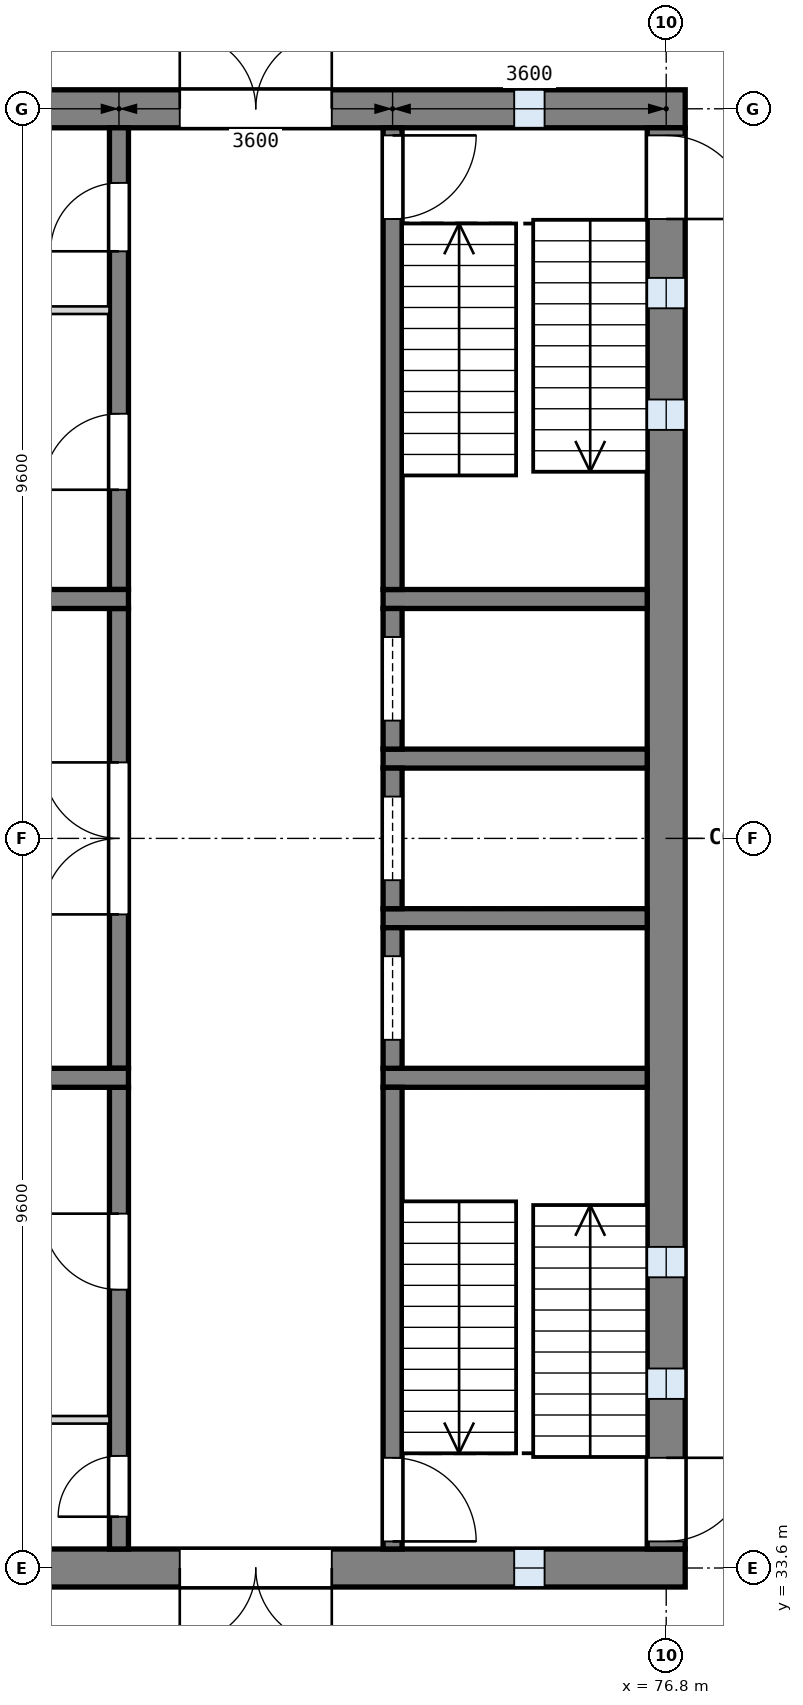
"""IFC4 building model, lengths in metres.
Left out: names, types, materials, properties, quantities, classifications, styles, units other than length and angle.
Written with IfcOpenShell. Run it as: python <this file> out.ifc"""

import sys

from ifc_helpers import new_model, si_unit, direction, frame, frame_2d, origin, place, context, subcontext, project, spatial, rectangle, extrude, element, fill, save


model = new_model("IFC4")
c1 = context("Model", 3, precision=1e-05, world=origin(), true_north=direction((0.0, 1.0)))
c2 = subcontext(c1, "Body", "Model", "MODEL_VIEW")
j1 = project(units=[si_unit("LENGTHUNIT", "METRE"), si_unit("PLANEANGLEUNIT", "RADIAN")], contexts=[c1])
p1 = place(None, origin())
s1 = spatial("IfcSite", under=j1, at=p1, CompositionType="ELEMENT")
p2 = place(p1, origin())
s2 = spatial("IfcBuilding", under=s1, at=p2, CompositionType="ELEMENT")
p3 = place(p2, frame((0.0, 0.0, 8.4)))
s3 = spatial("IfcBuildingStorey", under=s2, at=p3, CompositionType="ELEMENT", Elevation=8.4)
p4 = place(p3, frame((63.75, 52.8, 0.0), z_axis=(0.0, 0.0, 1.0), x_axis=(1.0, 0.0, 0.0)))
e1 = element("IfcWall", 1, at=p4, inside=s3, PredefinedType="SHEAR", context=c2, shape_type="SweptSolid", body=[
    extrude(rectangle(XDim=13.3, YDim=0.5, at=frame_2d((6.65, 0.0))), origin(), (0.0, 0.0, 1.0), 4.5),
])
p5 = place(p4, frame((11.05, 0.0, 1.0)))
e2 = element("IfcOpeningElement", 2, at=p5, cuts=e1, PredefinedType="OPENING", context=c2, shape_type="SweptSolid", body=[
    extrude(rectangle(XDim=0.4, YDim=2.0, at=frame_2d((0.2, 1.0))), frame((0.0, 0.26, 0.0), z_axis=(0.0, -1.0, 0.0), x_axis=(1.0, 0.0, 0.0)), (0.0, 0.0, 1.0), 0.52),
])
p6 = place(p4, frame((6.65, 0.0, 0.0)))
e3 = element("IfcOpeningElement", 3, at=p6, cuts=e1, PredefinedType="OPENING", context=c2, shape_type="SweptSolid", body=[
    extrude(rectangle(XDim=2.0, YDim=2.1, at=frame_2d((1.0, 1.05))), frame((0.0, 0.26, 0.0), z_axis=(0.0, -1.0, 0.0), x_axis=(1.0, 0.0, 0.0)), (0.0, 0.0, 1.0), 0.52),
])
p7 = place(p3, frame((63.75, 33.6, 0.0), z_axis=(0.0, 0.0, 1.0), x_axis=(1.0, 0.0, 0.0)))
e4 = element("IfcWall", 4, at=p7, inside=s3, PredefinedType="SHEAR", context=c2, shape_type="SweptSolid", body=[
    extrude(rectangle(XDim=13.3, YDim=0.5, at=frame_2d((6.65, 0.0))), origin(), (0.0, 0.0, 1.0), 4.5),
])
p8 = place(p7, frame((11.05, 0.0, 1.0)))
e5 = element("IfcOpeningElement", 5, at=p8, cuts=e4, PredefinedType="OPENING", context=c2, shape_type="SweptSolid", body=[
    extrude(rectangle(XDim=0.4, YDim=2.0, at=frame_2d((0.2, 1.0))), frame((0.0, 0.26, 0.0), z_axis=(0.0, -1.0, 0.0), x_axis=(1.0, 0.0, 0.0)), (0.0, 0.0, 1.0), 0.52),
])
p9 = place(p7, frame((6.65, 0.0, 0.0)))
e6 = element("IfcOpeningElement", 6, at=p9, cuts=e4, PredefinedType="OPENING", context=c2, shape_type="SweptSolid", body=[
    extrude(rectangle(XDim=2.0, YDim=2.1, at=frame_2d((1.0, 1.05))), frame((0.0, 0.26, 0.0), z_axis=(0.0, -1.0, 0.0), x_axis=(1.0, 0.0, 0.0)), (0.0, 0.0, 1.0), 0.52),
])
p10 = place(p3, frame((76.8, 33.85, 0.0), z_axis=(0.0, 0.0, 1.0), x_axis=(0.0, 1.0, 0.0)))
e7 = element("IfcWall", 7, at=p10, inside=s3, PredefinedType="SHEAR", context=c2, shape_type="SweptSolid", body=[
    extrude(rectangle(XDim=18.7, YDim=0.5, at=frame_2d((9.35, 0.0))), origin(), (0.0, 0.0, 1.0), 4.5),
])
p11 = place(p10, frame((1.975, 0.0, 1.0)))
e8 = element("IfcOpeningElement", 8, at=p11, cuts=e7, PredefinedType="OPENING", context=c2, shape_type="SweptSolid", body=[
    extrude(rectangle(XDim=0.4, YDim=2.0, at=frame_2d((0.2, 1.0))), frame((0.0, 0.26, 0.0), z_axis=(0.0, -1.0, 0.0), x_axis=(1.0, 0.0, 0.0)), (0.0, 0.0, 1.0), 0.52),
])
p12 = place(p10, frame((3.575, 0.0, 1.0)))
e9 = element("IfcOpeningElement", 9, at=p12, cuts=e7, PredefinedType="OPENING", context=c2, shape_type="SweptSolid", body=[
    extrude(rectangle(XDim=0.4, YDim=2.0, at=frame_2d((0.2, 1.0))), frame((0.0, 0.26, 0.0), z_axis=(0.0, -1.0, 0.0), x_axis=(1.0, 0.0, 0.0)), (0.0, 0.0, 1.0), 0.52),
])
p13 = place(p10, frame((14.725, 0.0, 1.0)))
e10 = element("IfcOpeningElement", 10, at=p13, cuts=e7, PredefinedType="OPENING", context=c2, shape_type="SweptSolid", body=[
    extrude(rectangle(XDim=0.4, YDim=2.0, at=frame_2d((0.2, 1.0))), frame((0.0, 0.26, 0.0), z_axis=(0.0, -1.0, 0.0), x_axis=(1.0, 0.0, 0.0)), (0.0, 0.0, 1.0), 0.52),
])
p14 = place(p10, frame((16.325, 0.0, 1.0)))
e11 = element("IfcOpeningElement", 11, at=p14, cuts=e7, PredefinedType="OPENING", context=c2, shape_type="SweptSolid", body=[
    extrude(rectangle(XDim=0.4, YDim=2.0, at=frame_2d((0.2, 1.0))), frame((0.0, 0.26, 0.0), z_axis=(0.0, -1.0, 0.0), x_axis=(1.0, 0.0, 0.0)), (0.0, 0.0, 1.0), 0.52),
])
p15 = place(p10, frame((0.1, 0.0, 0.0)))
e12 = element("IfcOpeningElement", 12, at=p15, cuts=e7, PredefinedType="OPENING", context=c2, shape_type="SweptSolid", body=[
    extrude(rectangle(XDim=1.1, YDim=2.1, at=frame_2d((0.55, 1.05))), frame((0.0, 0.26, 0.0), z_axis=(0.0, -1.0, 0.0), x_axis=(1.0, 0.0, 0.0)), (0.0, 0.0, 1.0), 0.52),
])
p16 = place(p10, frame((17.5, 0.0, 0.0)))
e13 = element("IfcOpeningElement", 13, at=p16, cuts=e7, PredefinedType="OPENING", context=c2, shape_type="SweptSolid", body=[
    extrude(rectangle(XDim=1.1, YDim=2.1, at=frame_2d((0.55, 1.05))), frame((0.0, 0.26, 0.0), z_axis=(0.0, -1.0, 0.0), x_axis=(1.0, 0.0, 0.0)), (0.0, 0.0, 1.0), 0.52),
])
for number, where, z_axis, x_axis in (
    (14, (76.55, 40.05, 0.0), (0.0, 0.0, 1.0), (-1.0, 0.0, 0.0)),
    (15, (76.55, 42.15, 0.0), (0.0, 0.0, 1.0), (-1.0, 0.0, 0.0)),
    (16, (76.55, 44.25, 0.0), (0.0, 0.0, 1.0), (-1.0, 0.0, 0.0)),
    (17, (76.55, 46.35, 0.0), (0.0, 0.0, 1.0), (-1.0, 0.0, 0.0)),
):
    element("IfcWall", number, at=place(p3, frame(where, z_axis=z_axis, x_axis=x_axis)), inside=s3, PredefinedType="SOLIDWALL", context=c2, shape_type="SweptSolid", body=[
        extrude(rectangle(XDim=3.475, YDim=0.25, at=frame_2d((1.738, 0.0))), origin(), (0.0, 0.0, 1.0), 4.2),
    ])
p17 = place(p3, frame((73.2, 33.85, 0.0), z_axis=(0.0, 0.0, 1.0), x_axis=(0.0, 1.0, 0.0)))
e18 = element("IfcWall", 18, at=p17, inside=s3, PredefinedType="SOLIDWALL", context=c2, shape_type="SweptSolid", body=[
    extrude(rectangle(XDim=6.075, YDim=0.25, at=frame_2d((3.038, 0.0))), origin(), (0.0, 0.0, 1.0), 4.2),
])
p18 = place(p17, frame((0.1, 0.0, 0.0)))
e19 = element("IfcOpeningElement", 19, at=p18, cuts=e18, PredefinedType="OPENING", context=c2, shape_type="SweptSolid", body=[
    extrude(rectangle(XDim=1.1, YDim=2.1, at=frame_2d((0.55, 1.05))), frame((0.0, 0.135, 0.0), z_axis=(0.0, -1.0, 0.0), x_axis=(1.0, 0.0, 0.0)), (0.0, 0.0, 1.0), 0.27),
])
p19 = place(p3, frame((73.2, 40.175, 0.0), z_axis=(0.0, 0.0, 1.0), x_axis=(0.0, 1.0, 0.0)))
e20 = element("IfcWall", 20, at=p19, inside=s3, PredefinedType="SOLIDWALL", context=c2, shape_type="SweptSolid", body=[
    extrude(rectangle(XDim=1.85, YDim=0.25, at=frame_2d((0.925, 0.0))), origin(), (0.0, 0.0, 1.0), 4.2),
])
p20 = place(p19, frame((0.375, 0.0, 0.0)))
e21 = element("IfcOpeningElement", 21, at=p20, cuts=e20, PredefinedType="OPENING", context=c2, shape_type="SweptSolid", body=[
    extrude(rectangle(XDim=1.1, YDim=2.1, at=frame_2d((0.55, 1.05))), frame((0.0, 0.135, 0.0), z_axis=(0.0, -1.0, 0.0), x_axis=(1.0, 0.0, 0.0)), (0.0, 0.0, 1.0), 0.27),
])
p21 = place(p3, frame((73.2, 42.275, 0.0), z_axis=(0.0, 0.0, 1.0), x_axis=(0.0, 1.0, 0.0)))
e22 = element("IfcWall", 22, at=p21, inside=s3, PredefinedType="SOLIDWALL", context=c2, shape_type="SweptSolid", body=[
    extrude(rectangle(XDim=1.85, YDim=0.25, at=frame_2d((0.925, 0.0))), origin(), (0.0, 0.0, 1.0), 4.2),
])
p22 = place(p21, frame((0.375, 0.0, 0.0)))
e23 = element("IfcOpeningElement", 23, at=p22, cuts=e22, PredefinedType="OPENING", context=c2, shape_type="SweptSolid", body=[
    extrude(rectangle(XDim=1.1, YDim=2.1, at=frame_2d((0.55, 1.05))), frame((0.0, 0.135, 0.0), z_axis=(0.0, -1.0, 0.0), x_axis=(1.0, 0.0, 0.0)), (0.0, 0.0, 1.0), 0.27),
])
p23 = place(p3, frame((73.2, 44.375, 0.0), z_axis=(0.0, 0.0, 1.0), x_axis=(0.0, 1.0, 0.0)))
e24 = element("IfcWall", 24, at=p23, inside=s3, PredefinedType="SOLIDWALL", context=c2, shape_type="SweptSolid", body=[
    extrude(rectangle(XDim=1.85, YDim=0.25, at=frame_2d((0.925, 0.0))), origin(), (0.0, 0.0, 1.0), 4.2),
])
p24 = place(p23, frame((0.375, 0.0, 0.0)))
e25 = element("IfcOpeningElement", 25, at=p24, cuts=e24, PredefinedType="OPENING", context=c2, shape_type="SweptSolid", body=[
    extrude(rectangle(XDim=1.1, YDim=2.1, at=frame_2d((0.55, 1.05))), frame((0.0, 0.135, 0.0), z_axis=(0.0, -1.0, 0.0), x_axis=(1.0, 0.0, 0.0)), (0.0, 0.0, 1.0), 0.27),
])
p25 = place(p3, frame((73.2, 46.475, 0.0), z_axis=(0.0, 0.0, 1.0), x_axis=(0.0, 1.0, 0.0)))
e26 = element("IfcWall", 26, at=p25, inside=s3, PredefinedType="SOLIDWALL", context=c2, shape_type="SweptSolid", body=[
    extrude(rectangle(XDim=6.075, YDim=0.25, at=frame_2d((3.038, 0.0))), origin(), (0.0, 0.0, 1.0), 4.2),
])
p26 = place(p25, frame((4.875, 0.0, 0.0)))
e27 = element("IfcOpeningElement", 27, at=p26, cuts=e26, PredefinedType="OPENING", context=c2, shape_type="SweptSolid", body=[
    extrude(rectangle(XDim=1.1, YDim=2.1, at=frame_2d((0.55, 1.05))), frame((0.0, 0.135, 0.0), z_axis=(0.0, -1.0, 0.0), x_axis=(1.0, 0.0, 0.0)), (0.0, 0.0, 1.0), 0.27),
])
p27 = place(p3, frame((69.6, 33.85, 0.0), z_axis=(0.0, 0.0, 1.0), x_axis=(0.0, 1.0, 0.0)))
e28 = element("IfcWall", 28, at=p27, inside=s3, PredefinedType="SOLIDWALL", context=c2, shape_type="SweptSolid", body=[
    extrude(rectangle(XDim=6.075, YDim=0.25, at=frame_2d((3.038, 0.0))), origin(), (0.0, 0.0, 1.0), 4.2),
])
p28 = place(p27, frame((0.425, 0.0, 0.0)))
e29 = element("IfcOpeningElement", 29, at=p28, cuts=e28, PredefinedType="OPENING", context=c2, shape_type="SweptSolid", body=[
    extrude(rectangle(XDim=0.8, YDim=2.1, at=frame_2d((0.4, 1.05))), frame((0.0, 0.135, 0.0), z_axis=(0.0, -1.0, 0.0), x_axis=(1.0, 0.0, 0.0)), (0.0, 0.0, 1.0), 0.27),
])
p29 = place(p27, frame((3.413, 0.0, 0.0)))
e30 = element("IfcOpeningElement", 30, at=p29, cuts=e28, PredefinedType="OPENING", context=c2, shape_type="SweptSolid", body=[
    extrude(rectangle(XDim=1.0, YDim=2.1, at=frame_2d((0.5, 1.05))), frame((0.0, 0.135, 0.0), z_axis=(0.0, -1.0, 0.0), x_axis=(1.0, 0.0, 0.0)), (0.0, 0.0, 1.0), 0.27),
])
p30 = place(p3, frame((69.6, 40.175, 0.0), z_axis=(0.0, 0.0, 1.0), x_axis=(0.0, 1.0, 0.0)))
e31 = element("IfcWall", 31, at=p30, inside=s3, PredefinedType="SOLIDWALL", context=c2, shape_type="SweptSolid", body=[
    extrude(rectangle(XDim=6.05, YDim=0.25, at=frame_2d((3.025, 0.0))), origin(), (0.0, 0.0, 1.0), 4.2),
])
p31 = place(p30, frame((2.025, 0.0, 0.0)))
e32 = element("IfcOpeningElement", 32, at=p31, cuts=e31, PredefinedType="OPENING", context=c2, shape_type="SweptSolid", body=[
    extrude(rectangle(XDim=2.0, YDim=2.1, at=frame_2d((1.0, 1.05))), frame((0.0, 0.135, 0.0), z_axis=(0.0, -1.0, 0.0), x_axis=(1.0, 0.0, 0.0)), (0.0, 0.0, 1.0), 0.27),
])
p32 = place(p3, frame((69.6, 46.475, 0.0), z_axis=(0.0, 0.0, 1.0), x_axis=(0.0, 1.0, 0.0)))
e33 = element("IfcWall", 33, at=p32, inside=s3, PredefinedType="SOLIDWALL", context=c2, shape_type="SweptSolid", body=[
    extrude(rectangle(XDim=6.075, YDim=0.25, at=frame_2d((3.038, 0.0))), origin(), (0.0, 0.0, 1.0), 4.2),
])
p33 = place(p32, frame((1.312, 0.0, 0.0)))
e34 = element("IfcOpeningElement", 34, at=p33, cuts=e33, PredefinedType="OPENING", context=c2, shape_type="SweptSolid", body=[
    extrude(rectangle(XDim=1.0, YDim=2.1, at=frame_2d((0.5, 1.05))), frame((0.0, 0.135, 0.0), z_axis=(0.0, -1.0, 0.0), x_axis=(1.0, 0.0, 0.0)), (0.0, 0.0, 1.0), 0.27),
])
p34 = place(p32, frame((4.45, 0.0, 0.0)))
e35 = element("IfcOpeningElement", 35, at=p34, cuts=e33, PredefinedType="OPENING", context=c2, shape_type="SweptSolid", body=[
    extrude(rectangle(XDim=0.9, YDim=2.1, at=frame_2d((0.45, 1.05))), frame((0.0, 0.135, 0.0), z_axis=(0.0, -1.0, 0.0), x_axis=(1.0, 0.0, 0.0)), (0.0, 0.0, 1.0), 0.27),
])
for number, where, z_axis, x_axis in (
    (36, (69.725, 40.05, 0.0), (0.0, 0.0, 1.0), (-1.0, 0.0, 0.0)),
    (37, (69.725, 46.35, 0.0), (0.0, 0.0, 1.0), (-1.0, 0.0, 0.0)),
):
    element("IfcWall", number, at=place(p3, frame(where, z_axis=z_axis, x_axis=x_axis)), inside=s3, PredefinedType="SOLIDWALL", context=c2, shape_type="SweptSolid", body=[
        extrude(rectangle(XDim=5.475, YDim=0.25, at=frame_2d((2.738, 0.0))), origin(), (0.0, 0.0, 1.0), 4.2),
    ])
for number, where, z_axis, x_axis in (
    (38, (69.475, 35.55, 0.0), (0.0, 0.0, 1.0), (-1.0, 0.0, 0.0)),
    (39, (69.475, 50.15, 0.0), (0.0, 0.0, 1.0), (-1.0, 0.0, 0.0)),
):
    element("IfcWall", number, at=place(p3, frame(where, z_axis=z_axis, x_axis=x_axis)), inside=s3, PredefinedType="PARTITIONING", context=c2, shape_type="SweptSolid", body=[
        extrude(rectangle(XDim=5.225, YDim=0.1, at=frame_2d((2.613, 0.0))), origin(), (0.0, 0.0, 1.0), 4.2),
    ])
p35 = place(p11, origin())
e40 = element("IfcWindow", 40, at=p35, inside=s3, PartitioningType="SINGLE_PANEL", PredefinedType="WINDOW", context=c2, shape_type="SweptSolid", body=[
    extrude(rectangle(XDim=0.4, YDim=2.0, at=frame_2d((0.2, 1.0))), frame((0.0, 0.03, 0.0), z_axis=(0.0, -1.0, 0.0), x_axis=(1.0, 0.0, 0.0)), (0.0, 0.0, 1.0), 0.06),
])
fill(e8, e40)
p36 = place(p12, origin())
e41 = element("IfcWindow", 41, at=p36, inside=s3, PartitioningType="SINGLE_PANEL", PredefinedType="WINDOW", context=c2, shape_type="SweptSolid", body=[
    extrude(rectangle(XDim=0.4, YDim=2.0, at=frame_2d((0.2, 1.0))), frame((0.0, 0.03, 0.0), z_axis=(0.0, -1.0, 0.0), x_axis=(1.0, 0.0, 0.0)), (0.0, 0.0, 1.0), 0.06),
])
fill(e9, e41)
p37 = place(p13, origin())
e42 = element("IfcWindow", 42, at=p37, inside=s3, PartitioningType="SINGLE_PANEL", PredefinedType="WINDOW", context=c2, shape_type="SweptSolid", body=[
    extrude(rectangle(XDim=0.4, YDim=2.0, at=frame_2d((0.2, 1.0))), frame((0.0, 0.03, 0.0), z_axis=(0.0, -1.0, 0.0), x_axis=(1.0, 0.0, 0.0)), (0.0, 0.0, 1.0), 0.06),
])
fill(e10, e42)
p38 = place(p14, origin())
e43 = element("IfcWindow", 43, at=p38, inside=s3, PartitioningType="SINGLE_PANEL", PredefinedType="WINDOW", context=c2, shape_type="SweptSolid", body=[
    extrude(rectangle(XDim=0.4, YDim=2.0, at=frame_2d((0.2, 1.0))), frame((0.0, 0.03, 0.0), z_axis=(0.0, -1.0, 0.0), x_axis=(1.0, 0.0, 0.0)), (0.0, 0.0, 1.0), 0.06),
])
fill(e11, e43)
p39 = place(p8, origin())
e44 = element("IfcWindow", 44, at=p39, inside=s3, PartitioningType="SINGLE_PANEL", PredefinedType="WINDOW", context=c2, shape_type="SweptSolid", body=[
    extrude(rectangle(XDim=0.4, YDim=2.0, at=frame_2d((0.2, 1.0))), frame((0.0, 0.03, 0.0), z_axis=(0.0, -1.0, 0.0), x_axis=(1.0, 0.0, 0.0)), (0.0, 0.0, 1.0), 0.06),
])
fill(e5, e44)
p40 = place(p5, origin())
e45 = element("IfcWindow", 45, at=p40, inside=s3, PartitioningType="SINGLE_PANEL", PredefinedType="WINDOW", context=c2, shape_type="SweptSolid", body=[
    extrude(rectangle(XDim=0.4, YDim=2.0, at=frame_2d((0.2, 1.0))), frame((0.0, 0.03, 0.0), z_axis=(0.0, -1.0, 0.0), x_axis=(1.0, 0.0, 0.0)), (0.0, 0.0, 1.0), 0.06),
])
fill(e2, e45)
p41 = place(p18, frame((1.1, 0.0, 0.0), z_axis=(0.0, 0.0, 1.0), x_axis=(-1.0, 0.0, 0.0)))
e46 = element("IfcDoor", 46, at=p41, inside=s3, OperationType="SINGLE_SWING_RIGHT", PredefinedType="DOOR", context=c2, shape_type="SweptSolid", body=[
    extrude(rectangle(XDim=1.1, YDim=2.1, at=frame_2d((0.55, 1.05))), frame((0.0, 0.025, 0.0), z_axis=(0.0, -1.0, 0.0), x_axis=(1.0, 0.0, 0.0)), (0.0, 0.0, 1.0), 0.05),
])
fill(e19, e46)
p42 = place(p26, frame((1.1, 0.0, 0.0), z_axis=(0.0, 0.0, 1.0), x_axis=(-1.0, 0.0, 0.0)))
e47 = element("IfcDoor", 47, at=p42, inside=s3, OperationType="SINGLE_SWING_LEFT", PredefinedType="DOOR", context=c2, shape_type="SweptSolid", body=[
    extrude(rectangle(XDim=1.1, YDim=2.1, at=frame_2d((0.55, 1.05))), frame((0.0, 0.025, 0.0), z_axis=(0.0, -1.0, 0.0), x_axis=(1.0, 0.0, 0.0)), (0.0, 0.0, 1.0), 0.05),
])
fill(e27, e47)
p43 = place(p20, origin())
e48 = element("IfcDoor", 48, at=p43, inside=s3, OperationType="SLIDING_TO_LEFT", PredefinedType="DOOR", context=c2, shape_type="SweptSolid", body=[
    extrude(rectangle(XDim=1.1, YDim=2.1, at=frame_2d((0.55, 1.05))), frame((0.0, 0.025, 0.0), z_axis=(0.0, -1.0, 0.0), x_axis=(1.0, 0.0, 0.0)), (0.0, 0.0, 1.0), 0.05),
])
fill(e21, e48)
p44 = place(p22, origin())
e49 = element("IfcDoor", 49, at=p44, inside=s3, OperationType="SLIDING_TO_LEFT", PredefinedType="DOOR", context=c2, shape_type="SweptSolid", body=[
    extrude(rectangle(XDim=1.1, YDim=2.1, at=frame_2d((0.55, 1.05))), frame((0.0, 0.025, 0.0), z_axis=(0.0, -1.0, 0.0), x_axis=(1.0, 0.0, 0.0)), (0.0, 0.0, 1.0), 0.05),
])
fill(e23, e49)
p45 = place(p24, origin())
e50 = element("IfcDoor", 50, at=p45, inside=s3, OperationType="SLIDING_TO_LEFT", PredefinedType="DOOR", context=c2, shape_type="SweptSolid", body=[
    extrude(rectangle(XDim=1.1, YDim=2.1, at=frame_2d((0.55, 1.05))), frame((0.0, 0.025, 0.0), z_axis=(0.0, -1.0, 0.0), x_axis=(1.0, 0.0, 0.0)), (0.0, 0.0, 1.0), 0.05),
])
fill(e25, e50)
p46 = place(p31, origin())
e51 = element("IfcDoor", 51, at=p46, inside=s3, OperationType="DOUBLE_DOOR_SINGLE_SWING", PredefinedType="DOOR", context=c2, shape_type="SweptSolid", body=[
    extrude(rectangle(XDim=2.0, YDim=2.1, at=frame_2d((1.0, 1.05))), frame((0.0, 0.025, 0.0), z_axis=(0.0, -1.0, 0.0), x_axis=(1.0, 0.0, 0.0)), (0.0, 0.0, 1.0), 0.05),
])
fill(e32, e51)
p47 = place(p28, origin())
e52 = element("IfcDoor", 52, at=p47, inside=s3, OperationType="SINGLE_SWING_LEFT", PredefinedType="DOOR", context=c2, shape_type="SweptSolid", body=[
    extrude(rectangle(XDim=0.8, YDim=2.1, at=frame_2d((0.4, 1.05))), frame((0.0, 0.025, 0.0), z_axis=(0.0, -1.0, 0.0), x_axis=(1.0, 0.0, 0.0)), (0.0, 0.0, 1.0), 0.05),
])
fill(e29, e52)
p48 = place(p29, origin())
e53 = element("IfcDoor", 53, at=p48, inside=s3, OperationType="SINGLE_SWING_RIGHT", PredefinedType="DOOR", context=c2, shape_type="SweptSolid", body=[
    extrude(rectangle(XDim=1.0, YDim=2.1, at=frame_2d((0.5, 1.05))), frame((0.0, 0.025, 0.0), z_axis=(0.0, -1.0, 0.0), x_axis=(1.0, 0.0, 0.0)), (0.0, 0.0, 1.0), 0.05),
])
fill(e30, e53)
p49 = place(p33, origin())
e54 = element("IfcDoor", 54, at=p49, inside=s3, OperationType="SINGLE_SWING_LEFT", PredefinedType="DOOR", context=c2, shape_type="SweptSolid", body=[
    extrude(rectangle(XDim=1.0, YDim=2.1, at=frame_2d((0.5, 1.05))), frame((0.0, 0.025, 0.0), z_axis=(0.0, -1.0, 0.0), x_axis=(1.0, 0.0, 0.0)), (0.0, 0.0, 1.0), 0.05),
])
fill(e34, e54)
p50 = place(p34, origin())
e55 = element("IfcDoor", 55, at=p50, inside=s3, OperationType="SINGLE_SWING_LEFT", PredefinedType="DOOR", context=c2, shape_type="SweptSolid", body=[
    extrude(rectangle(XDim=0.9, YDim=2.1, at=frame_2d((0.45, 1.05))), frame((0.0, 0.025, 0.0), z_axis=(0.0, -1.0, 0.0), x_axis=(1.0, 0.0, 0.0)), (0.0, 0.0, 1.0), 0.05),
])
fill(e35, e55)
p51 = place(p9, frame((2.0, 0.0, 0.0), z_axis=(0.0, 0.0, 1.0), x_axis=(-1.0, 0.0, 0.0)))
e56 = element("IfcDoor", 56, at=p51, inside=s3, OperationType="DOUBLE_DOOR_SINGLE_SWING", PredefinedType="DOOR", context=c2, shape_type="SweptSolid", body=[
    extrude(rectangle(XDim=2.0, YDim=2.1, at=frame_2d((1.0, 1.05))), frame((0.0, 0.025, 0.0), z_axis=(0.0, -1.0, 0.0), x_axis=(1.0, 0.0, 0.0)), (0.0, 0.0, 1.0), 0.05),
])
fill(e6, e56)
p52 = place(p6, origin())
e57 = element("IfcDoor", 57, at=p52, inside=s3, OperationType="DOUBLE_DOOR_SINGLE_SWING", PredefinedType="DOOR", context=c2, shape_type="SweptSolid", body=[
    extrude(rectangle(XDim=2.0, YDim=2.1, at=frame_2d((1.0, 1.05))), frame((0.0, 0.025, 0.0), z_axis=(0.0, -1.0, 0.0), x_axis=(1.0, 0.0, 0.0)), (0.0, 0.0, 1.0), 0.05),
])
fill(e3, e57)
p53 = place(p15, frame((1.1, 0.0, 0.0), z_axis=(0.0, 0.0, 1.0), x_axis=(-1.0, 0.0, 0.0)))
e58 = element("IfcDoor", 58, at=p53, inside=s3, OperationType="SINGLE_SWING_LEFT", PredefinedType="DOOR", context=c2, shape_type="SweptSolid", body=[
    extrude(rectangle(XDim=1.1, YDim=2.1, at=frame_2d((0.55, 1.05))), frame((0.0, 0.025, 0.0), z_axis=(0.0, -1.0, 0.0), x_axis=(1.0, 0.0, 0.0)), (0.0, 0.0, 1.0), 0.05),
])
fill(e12, e58)
p54 = place(p16, frame((1.1, 0.0, 0.0), z_axis=(0.0, 0.0, 1.0), x_axis=(-1.0, 0.0, 0.0)))
e59 = element("IfcDoor", 59, at=p54, inside=s3, OperationType="SINGLE_SWING_RIGHT", PredefinedType="DOOR", context=c2, shape_type="SweptSolid", body=[
    extrude(rectangle(XDim=1.1, YDim=2.1, at=frame_2d((0.55, 1.05))), frame((0.0, 0.025, 0.0), z_axis=(0.0, -1.0, 0.0), x_axis=(1.0, 0.0, 0.0)), (0.0, 0.0, 1.0), 0.05),
])
fill(e13, e59)
save(model, sys.argv[1])
